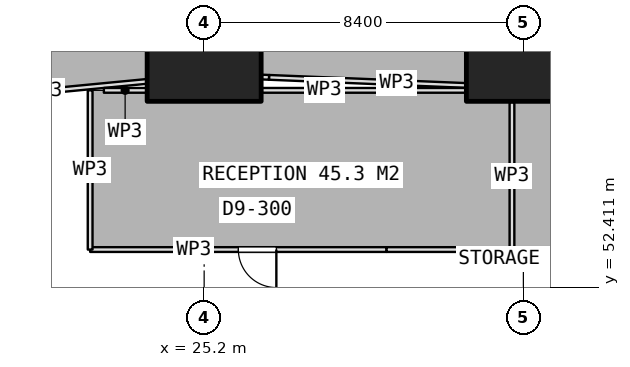
"""IFC4 building model, lengths in metres.
Left out: names, types, materials, properties, quantities, classifications, styles, units other than length and angle.
Written with IfcOpenShell. Run it as: python <this file> out.ifc"""

import sys

from ifc_helpers import new_model, si_unit, direction, frame, frame_2d, origin, origin_2d, place, context, subcontext, project, spatial, rectangle, extrude, element, fill, save


model = new_model("IFC4")
c1 = context("Model", 3, precision=1e-05, world=origin(), true_north=direction((0.0, 1.0)))
c2 = subcontext(c1, "Body", "Model", "MODEL_VIEW")
j1 = project(units=[si_unit("LENGTHUNIT", "METRE"), si_unit("PLANEANGLEUNIT", "RADIAN")], contexts=[c1])
p1 = place(None, origin())
s1 = spatial("IfcSite", under=j1, at=p1, CompositionType="ELEMENT")
p2 = place(p1, origin())
s2 = spatial("IfcBuilding", under=s1, at=p2, CompositionType="ELEMENT")
p3 = place(p2, frame((0.0, 0.0, 81.65)))
s3 = spatial("IfcBuildingStorey", under=s2, at=p3, CompositionType="ELEMENT", Elevation=81.65)
for number, where, z_axis, x_axis in (
    (1, (25.2, 58.8, 0.0), (0.0, 0.0, 1.0), (1.0, 0.0, 0.0)),
    (2, (33.6, 58.8, 0.0), (0.0, 0.0, 1.0), (1.0, 0.0, 0.0)),
):
    element("IfcColumn", number, at=place(p3, frame(where, z_axis=z_axis, x_axis=x_axis)), inside=s3, PredefinedType="COLUMN", context=c2, shape_type="SweptSolid", body=[
        extrude(rectangle(XDim=3.0, YDim=3.0, at=origin_2d()), origin(), (0.0, 0.0, 1.0), 3.75),
    ])
p4 = place(p3, frame((32.08, 57.718, 0.0), z_axis=(0.0, 0.0, 1.0), x_axis=(-0.99915427175, 0.041118624049, 0.0)))
e3 = element("IfcWall", 3, at=p4, inside=s3, PredefinedType="PARTITIONING", context=c2, shape_type="SweptSolid", body=[
    extrude(rectangle(XDim=5.177, YDim=0.125, at=frame_2d((2.589, 0.0))), origin(), (0.0, 0.0, 1.0), 3.4),
])
p5 = place(p3, frame((26.907, 57.931, 0.0), z_axis=(0.0, 0.0, 1.0), x_axis=(-0.999073306043, 0.043041017101, 0.0)))
e4 = element("IfcWall", 4, at=p5, inside=s3, PredefinedType="PARTITIONING", context=c2, shape_type="SweptSolid", body=[
    extrude(rectangle(XDim=0.187, YDim=0.125, at=frame_2d((0.094, 0.0))), origin(), (0.0, 0.0, 1.0), 3.4),
])
p6 = place(p3, frame((23.68, 57.823, 0.0), z_axis=(0.0, 0.0, 1.0), x_axis=(-0.995395894547, -0.095848907765, 0.0)))
e5 = element("IfcWall", 5, at=p6, inside=s3, PredefinedType="PARTITIONING", context=c2, shape_type="SweptSolid", body=[
    extrude(rectangle(XDim=5.385, YDim=0.125, at=frame_2d((2.692, 0.0))), origin(), (0.0, 0.0, 1.0), 3.4),
])
p7 = place(p3, frame((22.561, 57.589, 0.0), z_axis=(0.0, 0.0, 1.0), x_axis=(1.0, 0.0, 0.0)))
e6 = element("IfcWall", 6, at=p7, inside=s3, PredefinedType="PARTITIONING", context=c2, shape_type="SweptSolid", body=[
    extrude(rectangle(XDim=1.119, YDim=0.125, at=frame_2d((0.56, 0.0))), origin(), (0.0, 0.0, 1.0), 3.4),
])
p8 = place(p3, frame((26.72, 57.589, 0.0), z_axis=(0.0, 0.0, 1.0), x_axis=(1.0, 0.0, 0.0)))
e7 = element("IfcWall", 7, at=p8, inside=s3, PredefinedType="PARTITIONING", context=c2, shape_type="SweptSolid", body=[
    extrude(rectangle(XDim=3.28, YDim=0.125, at=frame_2d((1.64, 0.0))), origin(), (0.0, 0.0, 1.0), 3.4),
])
p9 = place(p3, frame((30.0, 53.4, 0.0), z_axis=(0.0, 0.0, 1.0), x_axis=(-1.0, 0.0, 0.0)))
e8 = element("IfcWall", 8, at=p9, inside=s3, PredefinedType="PARTITIONING", context=c2, shape_type="SweptSolid", body=[
    extrude(rectangle(XDim=7.8, YDim=0.125, at=frame_2d((3.9, 0.0))), origin(), (0.0, 0.0, 1.0), 3.4),
])
p10 = place(p9, frame((2.9, 0.0, 0.0)))
e9 = element("IfcOpeningElement", 9, at=p10, cuts=e8, PredefinedType="OPENING", context=c2, shape_type="SweptSolid", body=[
    extrude(rectangle(XDim=1.0, YDim=2.1, at=frame_2d((0.5, 1.05))), frame((0.0, 0.073, 0.0), z_axis=(0.0, -1.0, 0.0), x_axis=(1.0, 0.0, 0.0)), (0.0, 0.0, 1.0), 0.145),
])
p11 = place(p3, frame((22.2, 53.4, 0.0), z_axis=(0.0, 0.0, 1.0), x_axis=(0.0, 1.0, 0.0)))
e10 = element("IfcWall", 10, at=p11, inside=s3, PredefinedType="PARTITIONING", context=c2, shape_type="SweptSolid", body=[
    extrude(rectangle(XDim=4.189, YDim=0.125, at=frame_2d((2.095, 0.0))), origin(), (0.0, 0.0, 1.0), 3.4),
])
p12 = place(p3, frame((30.0, 57.589, 0.0), z_axis=(0.0, 0.0, 1.0), x_axis=(1.0, 0.0, 0.0)))
e11 = element("IfcWall", 11, at=p12, inside=s3, PredefinedType="PARTITIONING", context=c2, shape_type="SweptSolid", body=[
    extrude(rectangle(XDim=2.08, YDim=0.125, at=frame_2d((1.04, 0.0))), origin(), (0.0, 0.0, 1.0), 3.4),
])
p13 = place(p3, frame((33.3, 57.28, 0.0), z_axis=(0.0, 0.0, 1.0), x_axis=(0.0, -1.0, 0.0)))
e12 = element("IfcWall", 12, at=p13, inside=s3, PredefinedType="PARTITIONING", context=c2, shape_type="SweptSolid", body=[
    extrude(rectangle(XDim=3.88, YDim=0.125, at=frame_2d((1.94, 0.0))), origin(), (0.0, 0.0, 1.0), 3.4),
])
for number, where, z_axis, x_axis in (
    (13, (33.3, 53.4, 0.0), (0.0, 0.0, 1.0), (-1.0, 0.0, 0.0)),
    (14, (36.6, 53.4, 0.0), (0.0, 0.0, 1.0), (-1.0, 0.0, 0.0)),
):
    element("IfcWall", number, at=place(p3, frame(where, z_axis=z_axis, x_axis=x_axis)), inside=s3, PredefinedType="PARTITIONING", context=c2, shape_type="SweptSolid", body=[
        extrude(rectangle(XDim=3.3, YDim=0.125, at=frame_2d((1.65, 0.0))), origin(), (0.0, 0.0, 1.0), 3.4),
    ])
p14 = place(p10, origin())
e15 = element("IfcDoor", 15, at=p14, inside=s3, OperationType="SINGLE_SWING_LEFT", PredefinedType="DOOR", context=c2, shape_type="SweptSolid", body=[
    extrude(rectangle(XDim=1.0, YDim=2.1, at=frame_2d((0.5, 1.05))), frame((0.0, 0.025, 0.0), z_axis=(0.0, -1.0, 0.0), x_axis=(1.0, 0.0, 0.0)), (0.0, 0.0, 1.0), 0.05),
])
fill(e9, e15)
save(model, sys.argv[1])
